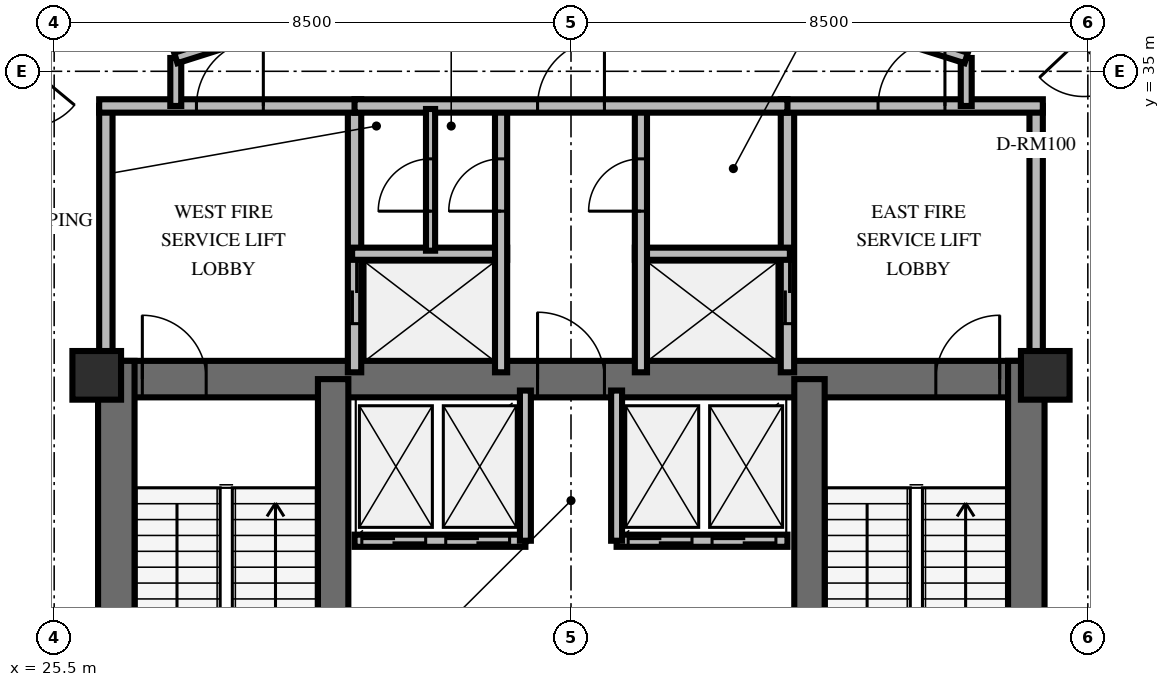
"""IFC4 building model, lengths in metres.
Left out: names, types, materials, properties, quantities, classifications, styles, units other than length and angle.
Written with IfcOpenShell. Run it as: python <this file> out.ifc"""

import sys

from ifc_helpers import new_model, si_unit, direction, frame, frame_2d, origin, origin_2d, place, context, subcontext, project, spatial, rectangle, extrude, element, fill, save


model = new_model("IFC4")
c1 = context("Model", 3, precision=1e-05, world=origin(), true_north=direction((0.0, 1.0)))
c2 = subcontext(c1, "Body", "Model", "MODEL_VIEW")
j1 = project(units=[si_unit("LENGTHUNIT", "METRE"), si_unit("PLANEANGLEUNIT", "RADIAN")], contexts=[c1])
p1 = place(None, origin())
s1 = spatial("IfcSite", under=j1, at=p1, CompositionType="ELEMENT")
p2 = place(p1, origin())
s2 = spatial("IfcBuilding", under=s1, at=p2, CompositionType="ELEMENT")
p3 = place(p2, frame((0.0, 0.0, 241.2)))
s3 = spatial("IfcBuildingStorey", under=s2, at=p3, CompositionType="ELEMENT", Elevation=241.2)
p4 = place(p3, frame((26.222, 29.938, 0.0), z_axis=(0.0, 0.0, 1.0), x_axis=(1.0, 0.0, 0.0)))
e1 = element("IfcWall", 1, at=p4, inside=s3, PredefinedType="SHEAR", context=c2, shape_type="SweptSolid", body=[
    extrude(rectangle(XDim=15.566, YDim=0.6, at=frame_2d((7.783, 0.0))), origin(), (0.0, 0.0, 1.0), 3.6),
])
p5 = place(p4, frame((0.728, 0.0, 0.0)))
e2 = element("IfcOpeningElement", 2, at=p5, cuts=e1, PredefinedType="OPENING", context=c2, shape_type="SweptSolid", body=[
    extrude(rectangle(XDim=1.05, YDim=2.15, at=frame_2d((0.525, 1.075))), frame((0.0, 0.31, 0.0), z_axis=(0.0, -1.0, 0.0), x_axis=(1.0, 0.0, 0.0)), (0.0, 0.0, 1.0), 0.62),
])
p6 = place(p4, frame((13.778, 0.0, 0.0)))
e3 = element("IfcOpeningElement", 3, at=p6, cuts=e1, PredefinedType="OPENING", context=c2, shape_type="SweptSolid", body=[
    extrude(rectangle(XDim=1.05, YDim=2.15, at=frame_2d((0.525, 1.075))), frame((0.0, 0.31, 0.0), z_axis=(0.0, -1.0, 0.0), x_axis=(1.0, 0.0, 0.0)), (0.0, 0.0, 1.0), 0.62),
])
p7 = place(p4, frame((7.228, 0.0, 0.0)))
e4 = element("IfcOpeningElement", 4, at=p7, cuts=e1, PredefinedType="OPENING", context=c2, shape_type="SweptSolid", body=[
    extrude(rectangle(XDim=1.1, YDim=2.15, at=frame_2d((0.55, 1.075))), frame((0.0, 0.31, 0.0), z_axis=(0.0, -1.0, 0.0), x_axis=(1.0, 0.0, 0.0)), (0.0, 0.0, 1.0), 0.62),
])
for number, where, z_axis, x_axis in (
    (5, (26.522, 19.962, 0.0), (0.0, 0.0, 1.0), (0.0, 1.0, 0.0)),
    (6, (41.488, 19.962, 0.0), (0.0, 0.0, 1.0), (0.0, 1.0, 0.0)),
):
    element("IfcWall", number, at=place(p3, frame(where, z_axis=z_axis, x_axis=x_axis)), inside=s3, PredefinedType="SHEAR", context=c2, shape_type="SweptSolid", body=[
        extrude(rectangle(XDim=10.276, YDim=0.6, at=frame_2d((5.138, 0.0))), origin(), (0.0, 0.0, 1.0), 3.6),
    ])
for number, where, z_axis, x_axis in (
    (7, (30.088, 20.262, 0.0), (0.0, 0.0, 1.0), (0.0, 1.0, 0.0)),
    (8, (37.922, 20.262, 0.0), (0.0, 0.0, 1.0), (0.0, 1.0, 0.0)),
):
    element("IfcWall", number, at=place(p3, frame(where, z_axis=z_axis, x_axis=x_axis)), inside=s3, PredefinedType="SHEAR", context=c2, shape_type="SweptSolid", body=[
        extrude(rectangle(XDim=9.676, YDim=0.5, at=frame_2d((4.838, 0.0))), origin(), (0.0, 0.0, 1.0), 3.6),
    ])
for number, where, z_axis, x_axis in (
    (9, (26.2, 30.0, 0.0), (0.0, 0.0, 1.0), (1.0, 0.0, 0.0)),
    (10, (41.8, 30.0, 0.0), (0.0, 0.0, 1.0), (1.0, 0.0, 0.0)),
):
    element("IfcColumn", number, at=place(p3, frame(where, z_axis=z_axis, x_axis=x_axis)), inside=s3, PredefinedType="PILASTER", context=c2, shape_type="SweptSolid", body=[
        extrude(rectangle(XDim=0.8, YDim=0.8, at=origin_2d()), origin(), (0.0, 0.0, 1.0), 3.6),
    ])
p8 = place(p3, frame((26.35, 30.05, 0.0), z_axis=(0.0, 0.0, 1.0), x_axis=(0.0, 1.0, 0.0)))
e11 = element("IfcWall", 11, at=p8, inside=s3, PredefinedType="SOLIDWALL", context=c2, shape_type="SweptSolid", body=[
    extrude(rectangle(XDim=4.38, YDim=0.22, at=frame_2d((2.19, 0.0))), origin(), (0.0, 0.0, 1.0), 2.46),
])
p9 = place(p3, frame((30.44, 30.05, 0.0), z_axis=(0.0, 0.0, 1.0), x_axis=(0.0, 1.0, 0.0)))
e12 = element("IfcWall", 12, at=p9, inside=s3, PredefinedType="SOLIDWALL", context=c2, shape_type="SweptSolid", body=[
    extrude(rectangle(XDim=4.38, YDim=0.22, at=frame_2d((2.19, 0.0))), origin(), (0.0, 0.0, 1.0), 2.46),
])
p10 = place(p9, frame((0.8, 0.0, 0.0)))
e13 = element("IfcOpeningElement", 13, at=p10, cuts=e12, PredefinedType="OPENING", context=c2, shape_type="SweptSolid", body=[
    extrude(rectangle(XDim=1.05, YDim=2.1, at=frame_2d((0.525, 1.05))), frame((0.0, 0.12, 0.0), z_axis=(0.0, -1.0, 0.0), x_axis=(1.0, 0.0, 0.0)), (0.0, 0.0, 1.0), 0.24),
])
p11 = place(p3, frame((26.24, 34.43, 0.0), z_axis=(0.0, 0.0, 1.0), x_axis=(1.0, 0.0, 0.0)))
e14 = element("IfcWall", 14, at=p11, inside=s3, PredefinedType="SOLIDWALL", context=c2, shape_type="SweptSolid", body=[
    extrude(rectangle(XDim=4.31, YDim=0.22, at=frame_2d((2.155, 0.0))), origin(), (0.0, 0.0, 1.0), 2.46),
])
p12 = place(p11, frame((1.6, 0.0, 0.0)))
e15 = element("IfcOpeningElement", 15, at=p12, cuts=e14, PredefinedType="OPENING", context=c2, shape_type="SweptSolid", body=[
    extrude(rectangle(XDim=1.1, YDim=2.15, at=frame_2d((0.55, 1.075))), frame((0.0, 0.12, 0.0), z_axis=(0.0, -1.0, 0.0), x_axis=(1.0, 0.0, 0.0)), (0.0, 0.0, 1.0), 0.24),
])
p13 = place(p3, frame((30.4, 32.0, 0.0), z_axis=(0.0, 0.0, 1.0), x_axis=(1.0, 0.0, 0.0)))
e16 = element("IfcWall", 16, at=p13, inside=s3, PredefinedType="SOLIDWALL", context=c2, shape_type="SweptSolid", body=[
    extrude(rectangle(XDim=2.55, YDim=0.2, at=frame_2d((1.275, 0.0))), origin(), (0.0, 0.0, 1.0), 2.46),
])
p14 = place(p3, frame((32.85, 30.05, 0.0), z_axis=(0.0, 0.0, 1.0), x_axis=(0.0, 1.0, 0.0)))
e17 = element("IfcWall", 17, at=p14, inside=s3, PredefinedType="SOLIDWALL", context=c2, shape_type="SweptSolid", body=[
    extrude(rectangle(XDim=4.38, YDim=0.2, at=frame_2d((2.19, 0.0))), origin(), (0.0, 0.0, 1.0), 2.46),
])
p15 = place(p14, frame((2.65, 0.0, 0.0)))
e18 = element("IfcOpeningElement", 18, at=p15, cuts=e17, PredefinedType="OPENING", context=c2, shape_type="SweptSolid", body=[
    extrude(rectangle(XDim=0.86, YDim=2.05, at=frame_2d((0.43, 1.025))), frame((0.0, 0.11, 0.0), z_axis=(0.0, -1.0, 0.0), x_axis=(1.0, 0.0, 0.0)), (0.0, 0.0, 1.0), 0.22),
])
p16 = place(p3, frame((37.56, 30.05, 0.0), z_axis=(0.0, 0.0, 1.0), x_axis=(0.0, 1.0, 0.0)))
e19 = element("IfcWall", 19, at=p16, inside=s3, PredefinedType="SOLIDWALL", context=c2, shape_type="SweptSolid", body=[
    extrude(rectangle(XDim=4.38, YDim=0.22, at=frame_2d((2.19, 0.0))), origin(), (0.0, 0.0, 1.0), 2.46),
])
p17 = place(p16, frame((0.8, 0.0, 0.0)))
e20 = element("IfcOpeningElement", 20, at=p17, cuts=e19, PredefinedType="OPENING", context=c2, shape_type="SweptSolid", body=[
    extrude(rectangle(XDim=1.05, YDim=2.1, at=frame_2d((0.525, 1.05))), frame((0.0, 0.12, 0.0), z_axis=(0.0, -1.0, 0.0), x_axis=(1.0, 0.0, 0.0)), (0.0, 0.0, 1.0), 0.24),
])
p18 = place(p3, frame((41.65, 30.05, 0.0), z_axis=(0.0, 0.0, 1.0), x_axis=(0.0, 1.0, 0.0)))
e21 = element("IfcWall", 21, at=p18, inside=s3, PredefinedType="SOLIDWALL", context=c2, shape_type="SweptSolid", body=[
    extrude(rectangle(XDim=4.38, YDim=0.22, at=frame_2d((2.19, 0.0))), origin(), (0.0, 0.0, 1.0), 2.46),
])
p19 = place(p3, frame((37.45, 34.43, 0.0), z_axis=(0.0, 0.0, 1.0), x_axis=(1.0, 0.0, 0.0)))
e22 = element("IfcWall", 22, at=p19, inside=s3, PredefinedType="SOLIDWALL", context=c2, shape_type="SweptSolid", body=[
    extrude(rectangle(XDim=4.31, YDim=0.22, at=frame_2d((2.155, 0.0))), origin(), (0.0, 0.0, 1.0), 2.46),
])
p20 = place(p19, frame((1.6, 0.0, 0.0)))
e23 = element("IfcOpeningElement", 23, at=p20, cuts=e22, PredefinedType="OPENING", context=c2, shape_type="SweptSolid", body=[
    extrude(rectangle(XDim=1.1, YDim=2.15, at=frame_2d((0.55, 1.075))), frame((0.0, 0.12, 0.0), z_axis=(0.0, -1.0, 0.0), x_axis=(1.0, 0.0, 0.0)), (0.0, 0.0, 1.0), 0.24),
])
p21 = place(p3, frame((35.05, 32.0, 0.0), z_axis=(0.0, 0.0, 1.0), x_axis=(1.0, 0.0, 0.0)))
e24 = element("IfcWall", 24, at=p21, inside=s3, PredefinedType="SOLIDWALL", context=c2, shape_type="SweptSolid", body=[
    extrude(rectangle(XDim=2.55, YDim=0.2, at=frame_2d((1.275, 0.0))), origin(), (0.0, 0.0, 1.0), 2.46),
])
p22 = place(p3, frame((35.15, 30.05, 0.0), z_axis=(0.0, 0.0, 1.0), x_axis=(0.0, 1.0, 0.0)))
e25 = element("IfcWall", 25, at=p22, inside=s3, PredefinedType="SOLIDWALL", context=c2, shape_type="SweptSolid", body=[
    extrude(rectangle(XDim=4.38, YDim=0.2, at=frame_2d((2.19, 0.0))), origin(), (0.0, 0.0, 1.0), 2.46),
])
p23 = place(p22, frame((2.65, 0.0, 0.0)))
e26 = element("IfcOpeningElement", 26, at=p23, cuts=e25, PredefinedType="OPENING", context=c2, shape_type="SweptSolid", body=[
    extrude(rectangle(XDim=0.86, YDim=2.05, at=frame_2d((0.43, 1.025))), frame((0.0, 0.11, 0.0), z_axis=(0.0, -1.0, 0.0), x_axis=(1.0, 0.0, 0.0)), (0.0, 0.0, 1.0), 0.22),
])
p24 = place(p3, frame((30.44, 34.43, 0.0), z_axis=(0.0, 0.0, 1.0), x_axis=(1.0, 0.0, 0.0)))
e27 = element("IfcWall", 27, at=p24, inside=s3, PredefinedType="SOLIDWALL", context=c2, shape_type="SweptSolid", body=[
    extrude(rectangle(XDim=7.12, YDim=0.22, at=frame_2d((3.56, 0.0))), origin(), (0.0, 0.0, 1.0), 2.46),
])
p25 = place(p24, frame((3.01, 0.0, 0.0)))
e28 = element("IfcOpeningElement", 28, at=p25, cuts=e27, PredefinedType="OPENING", context=c2, shape_type="SweptSolid", body=[
    extrude(rectangle(XDim=1.1, YDim=2.15, at=frame_2d((0.55, 1.075))), frame((0.0, 0.12, 0.0), z_axis=(0.0, -1.0, 0.0), x_axis=(1.0, 0.0, 0.0)), (0.0, 0.0, 1.0), 0.24),
])
p26 = place(p3, frame((31.69, 32.05, 0.0), z_axis=(0.0, 0.0, 1.0), x_axis=(0.0, 1.0, 0.0)))
e29 = element("IfcWall", 29, at=p26, inside=s3, PredefinedType="PARTITIONING", context=c2, shape_type="SweptSolid", body=[
    extrude(rectangle(XDim=2.33, YDim=0.15, at=frame_2d((1.165, 0.0))), origin(), (0.0, 0.0, 1.0), 2.46),
])
p27 = place(p26, frame((0.65, 0.0, 0.0)))
e30 = element("IfcOpeningElement", 30, at=p27, cuts=e29, PredefinedType="OPENING", context=c2, shape_type="SweptSolid", body=[
    extrude(rectangle(XDim=0.86, YDim=2.05, at=frame_2d((0.43, 1.025))), frame((0.0, 0.085, 0.0), z_axis=(0.0, -1.0, 0.0), x_axis=(1.0, 0.0, 0.0)), (0.0, 0.0, 1.0), 0.17),
])
p28 = place(p3, frame((30.44, 27.28, 0.0), z_axis=(0.0, 0.0, 1.0), x_axis=(1.0, 0.0, 0.0)))
e31 = element("IfcWall", 31, at=p28, inside=s3, PredefinedType="SOLIDWALL", context=c2, shape_type="SweptSolid", body=[
    extrude(rectangle(XDim=2.81, YDim=0.2, at=frame_2d((1.405, 0.0))), origin(), (0.0, 0.0, 1.0), 2.46),
])
p29 = place(p28, frame((0.12, 0.0, 0.0)))
e32 = element("IfcOpeningElement", 32, at=p29, cuts=e31, PredefinedType="OPENING", context=c2, shape_type="SweptSolid", body=[
    extrude(rectangle(XDim=1.05, YDim=2.1, at=frame_2d((0.525, 1.05))), frame((0.0, 0.11, 0.0), z_axis=(0.0, -1.0, 0.0), x_axis=(1.0, 0.0, 0.0)), (0.0, 0.0, 1.0), 0.22),
])
p30 = place(p28, frame((1.5, 0.0, 0.0)))
e33 = element("IfcOpeningElement", 33, at=p30, cuts=e31, PredefinedType="OPENING", context=c2, shape_type="SweptSolid", body=[
    extrude(rectangle(XDim=1.05, YDim=2.1, at=frame_2d((0.525, 1.05))), frame((0.0, 0.11, 0.0), z_axis=(0.0, -1.0, 0.0), x_axis=(1.0, 0.0, 0.0)), (0.0, 0.0, 1.0), 0.22),
])
p31 = place(p3, frame((33.25, 27.28, 0.0), z_axis=(0.0, 0.0, 1.0), x_axis=(0.0, 1.0, 0.0)))
e34 = element("IfcWall", 34, at=p31, inside=s3, PredefinedType="SOLIDWALL", context=c2, shape_type="SweptSolid", body=[
    extrude(rectangle(XDim=2.47, YDim=0.18, at=frame_2d((1.235, 0.0))), origin(), (0.0, 0.0, 1.0), 2.46),
])
p32 = place(p3, frame((34.75, 27.28, 0.0), z_axis=(0.0, 0.0, 1.0), x_axis=(1.0, 0.0, 0.0)))
e35 = element("IfcWall", 35, at=p32, inside=s3, PredefinedType="SOLIDWALL", context=c2, shape_type="SweptSolid", body=[
    extrude(rectangle(XDim=2.81, YDim=0.2, at=frame_2d((1.405, 0.0))), origin(), (0.0, 0.0, 1.0), 2.46),
])
p33 = place(p32, frame((0.19, 0.0, 0.0)))
e36 = element("IfcOpeningElement", 36, at=p33, cuts=e35, PredefinedType="OPENING", context=c2, shape_type="SweptSolid", body=[
    extrude(rectangle(XDim=1.05, YDim=2.1, at=frame_2d((0.525, 1.05))), frame((0.0, 0.11, 0.0), z_axis=(0.0, -1.0, 0.0), x_axis=(1.0, 0.0, 0.0)), (0.0, 0.0, 1.0), 0.22),
])
p34 = place(p32, frame((1.57, 0.0, 0.0)))
e37 = element("IfcOpeningElement", 37, at=p34, cuts=e35, PredefinedType="OPENING", context=c2, shape_type="SweptSolid", body=[
    extrude(rectangle(XDim=1.05, YDim=2.1, at=frame_2d((0.525, 1.05))), frame((0.0, 0.11, 0.0), z_axis=(0.0, -1.0, 0.0), x_axis=(1.0, 0.0, 0.0)), (0.0, 0.0, 1.0), 0.22),
])
p35 = place(p3, frame((34.75, 27.28, 0.0), z_axis=(0.0, 0.0, 1.0), x_axis=(0.0, 1.0, 0.0)))
e38 = element("IfcWall", 38, at=p35, inside=s3, PredefinedType="SOLIDWALL", context=c2, shape_type="SweptSolid", body=[
    extrude(rectangle(XDim=2.47, YDim=0.18, at=frame_2d((1.235, 0.0))), origin(), (0.0, 0.0, 1.0), 2.46),
])
for number, where, z_axis, x_axis in (
    (39, (27.5, 34.43, 0.0), (0.0, 0.0, 1.0), (0.0, 1.0, 0.0)),
    (40, (40.5, 35.219, 0.0), (0.0, 0.0, 1.0), (0.0, -1.0, 0.0)),
):
    element("IfcWall", number, at=place(p3, frame(where, z_axis=z_axis, x_axis=x_axis)), inside=s3, PredefinedType="PARTITIONING", context=c2, shape_type="SweptSolid", body=[
        extrude(rectangle(XDim=0.789, YDim=0.18, at=frame_2d((0.395, 0.0))), origin(), (0.0, 0.0, 1.0), 2.46),
    ])
p36 = place(p3, frame((27.5, 35.219, 0.0), z_axis=(0.0, 0.0, 1.0), x_axis=(0.953228121756, 0.302251795518, 0.0)))
e41 = element("IfcWall", 41, at=p36, inside=s3, PredefinedType="PARTITIONING", context=c2, shape_type="SweptSolid", body=[
    extrude(rectangle(XDim=6.819, YDim=0.18, at=frame_2d((3.409, 0.0))), origin(), (0.0, 0.0, 1.0), 2.46),
])
p37 = place(p36, frame((2.86, 0.0, 0.0)))
e42 = element("IfcOpeningElement", 42, at=p37, cuts=e41, PredefinedType="OPENING", context=c2, shape_type="SweptSolid", body=[
    extrude(rectangle(XDim=1.1, YDim=2.15, at=frame_2d((0.55, 1.075))), frame((0.0, 0.1, 0.0), z_axis=(0.0, -1.0, 0.0), x_axis=(1.0, 0.0, 0.0)), (0.0, 0.0, 1.0), 0.2),
])
p38 = place(p3, frame((34.0, 37.28, 0.0), z_axis=(0.0, 0.0, 1.0), x_axis=(0.953228121756, -0.302251795518, 0.0)))
e43 = element("IfcWall", 43, at=p38, inside=s3, PredefinedType="PARTITIONING", context=c2, shape_type="SweptSolid", body=[
    extrude(rectangle(XDim=6.819, YDim=0.18, at=frame_2d((3.409, 0.0))), origin(), (0.0, 0.0, 1.0), 2.46),
])
p39 = place(p38, frame((2.86, 0.0, 0.0)))
e44 = element("IfcOpeningElement", 44, at=p39, cuts=e43, PredefinedType="OPENING", context=c2, shape_type="SweptSolid", body=[
    extrude(rectangle(XDim=1.1, YDim=2.15, at=frame_2d((0.55, 1.075))), frame((0.0, 0.1, 0.0), z_axis=(0.0, -1.0, 0.0), x_axis=(1.0, 0.0, 0.0)), (0.0, 0.0, 1.0), 0.2),
])
p40 = place(p3, frame((44.625, 33.262, 0.0), z_axis=(0.0, 0.0, 1.0), x_axis=(-0.686440124719, 0.727186327688, 0.0)))
e45 = element("IfcWall", 45, at=p40, inside=s3, PredefinedType="PARTITIONING", context=c2, shape_type="SweptSolid", body=[
    extrude(rectangle(XDim=4.026, YDim=0.18, at=frame_2d((2.013, 0.0))), origin(), (0.0, 0.0, 1.0), 2.46),
])
p41 = place(p40, frame((2.195, 0.0, 0.0)))
e46 = element("IfcOpeningElement", 46, at=p41, cuts=e45, PredefinedType="OPENING", context=c2, shape_type="SweptSolid", body=[
    extrude(rectangle(XDim=1.0, YDim=2.15, at=frame_2d((0.5, 1.075))), frame((0.0, 0.1, 0.0), z_axis=(0.0, -1.0, 0.0), x_axis=(1.0, 0.0, 0.0)), (0.0, 0.0, 1.0), 0.2),
])
p42 = place(p3, frame((25.667, 35.808, 0.0), z_axis=(0.0, 0.0, 1.0), x_axis=(-0.638070606168, -0.769977857828, 0.0)))
e47 = element("IfcWall", 47, at=p42, inside=s3, PredefinedType="PARTITIONING", context=c2, shape_type="SweptSolid", body=[
    extrude(rectangle(XDim=4.47, YDim=0.18, at=frame_2d((2.235, 0.0))), origin(), (0.0, 0.0, 1.0), 2.46),
])
p43 = place(p42, frame((0.942, 0.0, 0.0)))
e48 = element("IfcOpeningElement", 48, at=p43, cuts=e47, PredefinedType="OPENING", context=c2, shape_type="SweptSolid", body=[
    extrude(rectangle(XDim=1.0, YDim=2.15, at=frame_2d((0.5, 1.075))), frame((0.0, 0.1, 0.0), z_axis=(0.0, -1.0, 0.0), x_axis=(1.0, 0.0, 0.0)), (0.0, 0.0, 1.0), 0.2),
])
p44 = place(p5, origin())
e49 = element("IfcDoor", 49, at=p44, inside=s3, OperationType="SINGLE_SWING_LEFT", PredefinedType="DOOR", context=c2, shape_type="SweptSolid", body=[
    extrude(rectangle(XDim=1.05, YDim=2.15, at=frame_2d((0.525, 1.075))), frame((0.0, 0.025, 0.0), z_axis=(0.0, -1.0, 0.0), x_axis=(1.0, 0.0, 0.0)), (0.0, 0.0, 1.0), 0.05),
])
fill(e2, e49)
p45 = place(p6, origin())
e50 = element("IfcDoor", 50, at=p45, inside=s3, OperationType="SINGLE_SWING_RIGHT", PredefinedType="DOOR", context=c2, shape_type="SweptSolid", body=[
    extrude(rectangle(XDim=1.05, YDim=2.15, at=frame_2d((0.525, 1.075))), frame((0.0, 0.025, 0.0), z_axis=(0.0, -1.0, 0.0), x_axis=(1.0, 0.0, 0.0)), (0.0, 0.0, 1.0), 0.05),
])
fill(e3, e50)
p46 = place(p7, origin())
e51 = element("IfcDoor", 51, at=p46, inside=s3, OperationType="SINGLE_SWING_LEFT", PredefinedType="DOOR", context=c2, shape_type="SweptSolid", body=[
    extrude(rectangle(XDim=1.1, YDim=2.15, at=frame_2d((0.55, 1.075))), frame((0.0, 0.025, 0.0), z_axis=(0.0, -1.0, 0.0), x_axis=(1.0, 0.0, 0.0)), (0.0, 0.0, 1.0), 0.05),
])
fill(e4, e51)
p47 = place(p12, origin())
e52 = element("IfcDoor", 52, at=p47, inside=s3, OperationType="SINGLE_SWING_RIGHT", PredefinedType="DOOR", context=c2, shape_type="SweptSolid", body=[
    extrude(rectangle(XDim=1.1, YDim=2.15, at=frame_2d((0.55, 1.075))), frame((0.0, 0.025, 0.0), z_axis=(0.0, -1.0, 0.0), x_axis=(1.0, 0.0, 0.0)), (0.0, 0.0, 1.0), 0.05),
])
fill(e15, e52)
p48 = place(p10, origin())
e53 = element("IfcDoor", 53, at=p48, inside=s3, OperationType="DOUBLE_DOOR_SLIDING", PredefinedType="USERDEFINED", context=c2, shape_type="SweptSolid", body=[
    extrude(rectangle(XDim=1.05, YDim=2.1, at=frame_2d((0.525, 1.05))), frame((0.0, 0.025, 0.0), z_axis=(0.0, -1.0, 0.0), x_axis=(1.0, 0.0, 0.0)), (0.0, 0.0, 1.0), 0.05),
])
fill(e13, e53)
p49 = place(p15, origin())
e54 = element("IfcDoor", 54, at=p49, inside=s3, OperationType="SINGLE_SWING_LEFT", PredefinedType="TRAPDOOR", context=c2, shape_type="SweptSolid", body=[
    extrude(rectangle(XDim=0.86, YDim=2.05, at=frame_2d((0.43, 1.025))), frame((0.0, 0.025, 0.0), z_axis=(0.0, -1.0, 0.0), x_axis=(1.0, 0.0, 0.0)), (0.0, 0.0, 1.0), 0.05),
])
fill(e18, e54)
p50 = place(p20, origin())
e55 = element("IfcDoor", 55, at=p50, inside=s3, OperationType="SINGLE_SWING_RIGHT", PredefinedType="DOOR", context=c2, shape_type="SweptSolid", body=[
    extrude(rectangle(XDim=1.1, YDim=2.15, at=frame_2d((0.55, 1.075))), frame((0.0, 0.025, 0.0), z_axis=(0.0, -1.0, 0.0), x_axis=(1.0, 0.0, 0.0)), (0.0, 0.0, 1.0), 0.05),
])
fill(e23, e55)
p51 = place(p17, origin())
e56 = element("IfcDoor", 56, at=p51, inside=s3, OperationType="DOUBLE_DOOR_SLIDING", PredefinedType="USERDEFINED", context=c2, shape_type="SweptSolid", body=[
    extrude(rectangle(XDim=1.05, YDim=2.1, at=frame_2d((0.525, 1.05))), frame((0.0, 0.025, 0.0), z_axis=(0.0, -1.0, 0.0), x_axis=(1.0, 0.0, 0.0)), (0.0, 0.0, 1.0), 0.05),
])
fill(e20, e56)
p52 = place(p23, origin())
e57 = element("IfcDoor", 57, at=p52, inside=s3, OperationType="SINGLE_SWING_LEFT", PredefinedType="TRAPDOOR", context=c2, shape_type="SweptSolid", body=[
    extrude(rectangle(XDim=0.86, YDim=2.05, at=frame_2d((0.43, 1.025))), frame((0.0, 0.025, 0.0), z_axis=(0.0, -1.0, 0.0), x_axis=(1.0, 0.0, 0.0)), (0.0, 0.0, 1.0), 0.05),
])
fill(e26, e57)
p53 = place(p25, origin())
e58 = element("IfcDoor", 58, at=p53, inside=s3, OperationType="SINGLE_SWING_RIGHT", PredefinedType="DOOR", context=c2, shape_type="SweptSolid", body=[
    extrude(rectangle(XDim=1.1, YDim=2.15, at=frame_2d((0.55, 1.075))), frame((0.0, 0.025, 0.0), z_axis=(0.0, -1.0, 0.0), x_axis=(1.0, 0.0, 0.0)), (0.0, 0.0, 1.0), 0.05),
])
fill(e28, e58)
p54 = place(p27, origin())
e59 = element("IfcDoor", 59, at=p54, inside=s3, OperationType="SINGLE_SWING_LEFT", PredefinedType="TRAPDOOR", context=c2, shape_type="SweptSolid", body=[
    extrude(rectangle(XDim=0.86, YDim=2.05, at=frame_2d((0.43, 1.025))), frame((0.0, 0.025, 0.0), z_axis=(0.0, -1.0, 0.0), x_axis=(1.0, 0.0, 0.0)), (0.0, 0.0, 1.0), 0.05),
])
fill(e30, e59)
p55 = place(p29, origin())
e60 = element("IfcDoor", 60, at=p55, inside=s3, OperationType="DOUBLE_DOOR_SLIDING", PredefinedType="USERDEFINED", context=c2, shape_type="SweptSolid", body=[
    extrude(rectangle(XDim=1.05, YDim=2.1, at=frame_2d((0.525, 1.05))), frame((0.0, 0.025, 0.0), z_axis=(0.0, -1.0, 0.0), x_axis=(1.0, 0.0, 0.0)), (0.0, 0.0, 1.0), 0.05),
])
fill(e32, e60)
p56 = place(p30, origin())
e61 = element("IfcDoor", 61, at=p56, inside=s3, OperationType="DOUBLE_DOOR_SLIDING", PredefinedType="USERDEFINED", context=c2, shape_type="SweptSolid", body=[
    extrude(rectangle(XDim=1.05, YDim=2.1, at=frame_2d((0.525, 1.05))), frame((0.0, 0.025, 0.0), z_axis=(0.0, -1.0, 0.0), x_axis=(1.0, 0.0, 0.0)), (0.0, 0.0, 1.0), 0.05),
])
fill(e33, e61)
p57 = place(p33, origin())
e62 = element("IfcDoor", 62, at=p57, inside=s3, OperationType="DOUBLE_DOOR_SLIDING", PredefinedType="USERDEFINED", context=c2, shape_type="SweptSolid", body=[
    extrude(rectangle(XDim=1.05, YDim=2.1, at=frame_2d((0.525, 1.05))), frame((0.0, 0.025, 0.0), z_axis=(0.0, -1.0, 0.0), x_axis=(1.0, 0.0, 0.0)), (0.0, 0.0, 1.0), 0.05),
])
fill(e36, e62)
p58 = place(p34, origin())
e63 = element("IfcDoor", 63, at=p58, inside=s3, OperationType="DOUBLE_DOOR_SLIDING", PredefinedType="USERDEFINED", context=c2, shape_type="SweptSolid", body=[
    extrude(rectangle(XDim=1.05, YDim=2.1, at=frame_2d((0.525, 1.05))), frame((0.0, 0.025, 0.0), z_axis=(0.0, -1.0, 0.0), x_axis=(1.0, 0.0, 0.0)), (0.0, 0.0, 1.0), 0.05),
])
fill(e37, e63)
p59 = place(p41, origin())
e64 = element("IfcDoor", 64, at=p59, inside=s3, OperationType="SINGLE_SWING_RIGHT", PredefinedType="DOOR", context=c2, shape_type="SweptSolid", body=[
    extrude(rectangle(XDim=1.0, YDim=2.15, at=frame_2d((0.5, 1.075))), frame((0.0, 0.025, 0.0), z_axis=(0.0, -1.0, 0.0), x_axis=(1.0, 0.0, 0.0)), (0.0, 0.0, 1.0), 0.05),
])
fill(e46, e64)
save(model, sys.argv[1])
